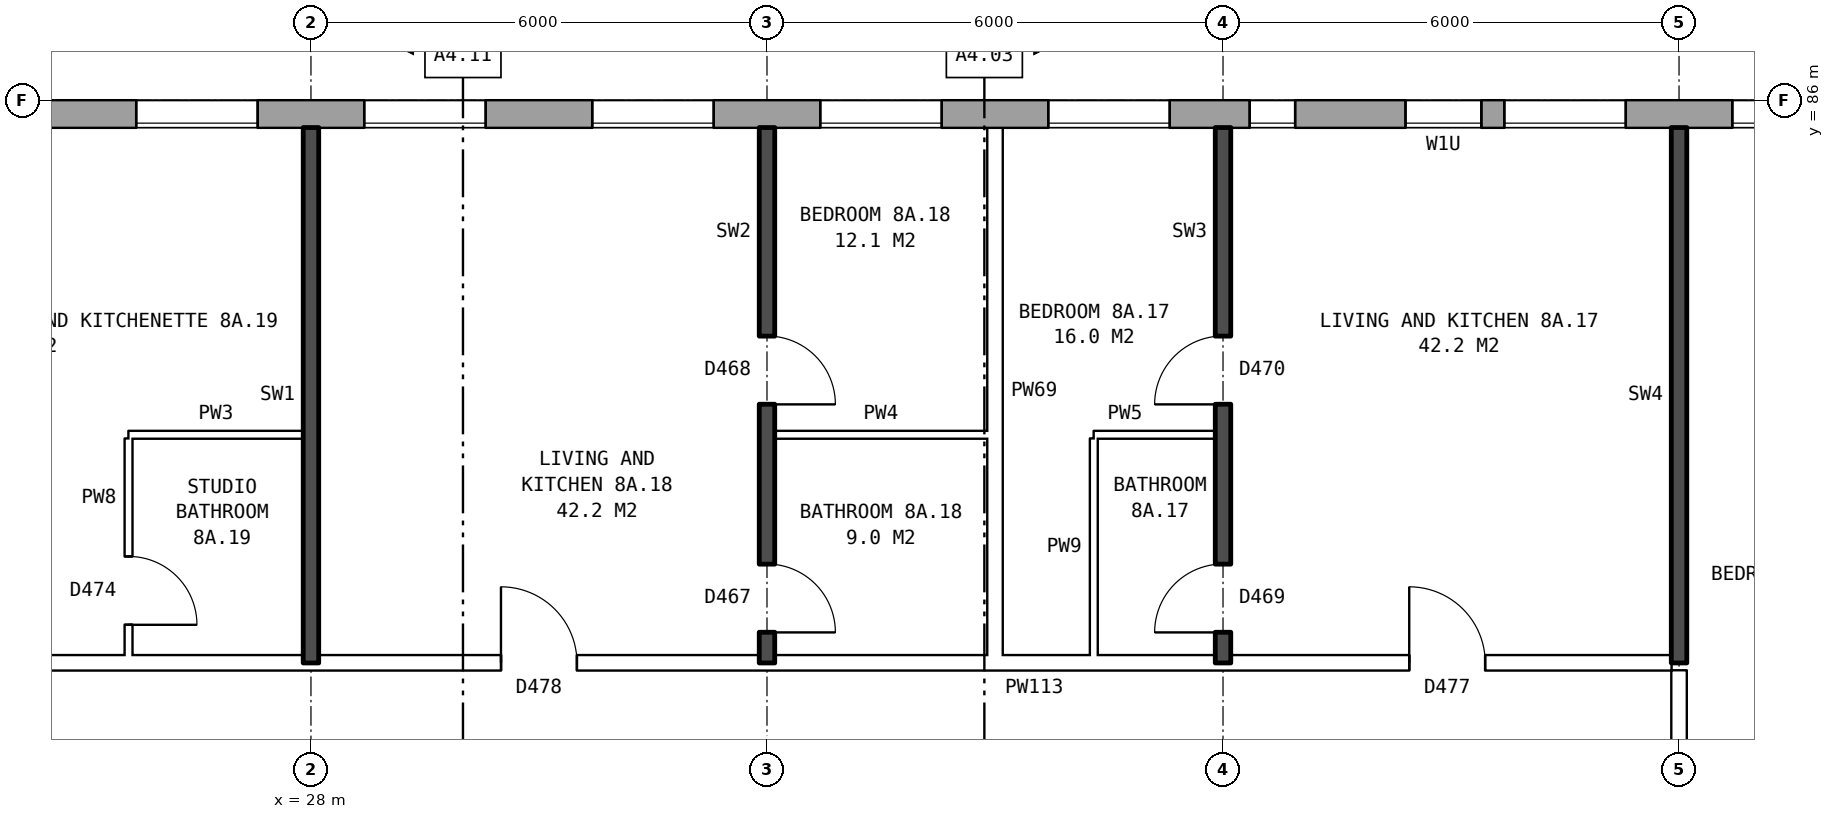
"""IFC4 building model, lengths in metres.
Left out: names, types, materials, properties, quantities, classifications, styles, units other than length and angle.
Written with IfcOpenShell. Run it as: python <this file> out.ifc"""

import sys

from ifc_helpers import new_model, si_unit, direction, frame, frame_2d, origin, place, context, subcontext, project, spatial, rectangle, extrude, element, fill, save


model = new_model("IFC4")
c1 = context("Model", 3, precision=1e-05, world=origin(), true_north=direction((0.0, 1.0)))
c2 = subcontext(c1, "Body", "Model", "MODEL_VIEW")
j1 = project(units=[si_unit("LENGTHUNIT", "METRE"), si_unit("PLANEANGLEUNIT", "RADIAN")], contexts=[c1])
p1 = place(None, origin())
s1 = spatial("IfcSite", under=j1, at=p1, CompositionType="ELEMENT")
p2 = place(p1, origin())
s2 = spatial("IfcBuilding", under=s1, at=p2, CompositionType="ELEMENT")
p3 = place(p2, frame((0.0, 0.0, 31.9)))
s3 = spatial("IfcBuildingStorey", under=s2, at=p3, CompositionType="ELEMENT", Elevation=31.9)
p4 = place(p3, frame((72.925, 85.82, 0.0), z_axis=(0.0, 0.0, 1.0), x_axis=(-1.0, 0.0, 0.0)))
e1 = element("IfcWall", 1, at=p4, inside=s3, PredefinedType="STANDARD", context=c2, shape_type="SweptSolid", body=[
    extrude(rectangle(XDim=50.101, YDim=0.36, at=frame_2d((25.05, 0.0))), origin(), (0.0, 0.0, 1.0), 2.85),
])
p5 = place(p4, frame((0.625, 0.0, 0.8)))
e2 = element("IfcOpeningElement", 2, at=p5, cuts=e1, PredefinedType="OPENING", context=c2, shape_type="SweptSolid", body=[
    extrude(rectangle(XDim=1.6, YDim=1.8, at=frame_2d((0.8, 0.9))), frame((0.0, 0.19, 0.0), z_axis=(0.0, -1.0, 0.0), x_axis=(1.0, 0.0, 0.0)), (0.0, 0.0, 1.0), 0.38),
])
p6 = place(p4, frame((3.625, 0.0, 0.8)))
e3 = element("IfcOpeningElement", 3, at=p6, cuts=e1, PredefinedType="OPENING", context=c2, shape_type="SweptSolid", body=[
    extrude(rectangle(XDim=1.6, YDim=1.8, at=frame_2d((0.8, 0.9))), frame((0.0, 0.19, 0.0), z_axis=(0.0, -1.0, 0.0), x_axis=(1.0, 0.0, 0.0)), (0.0, 0.0, 1.0), 0.38),
])
p7 = place(p4, frame((6.625, 0.0, 0.8)))
e4 = element("IfcOpeningElement", 4, at=p7, cuts=e1, PredefinedType="OPENING", context=c2, shape_type="SweptSolid", body=[
    extrude(rectangle(XDim=1.6, YDim=1.8, at=frame_2d((0.8, 0.9))), frame((0.0, 0.19, 0.0), z_axis=(0.0, -1.0, 0.0), x_axis=(1.0, 0.0, 0.0)), (0.0, 0.0, 1.0), 0.38),
])
p8 = place(p4, frame((9.625, 0.0, 0.8)))
e5 = element("IfcOpeningElement", 5, at=p8, cuts=e1, PredefinedType="OPENING", context=c2, shape_type="SweptSolid", body=[
    extrude(rectangle(XDim=1.6, YDim=1.8, at=frame_2d((0.8, 0.9))), frame((0.0, 0.19, 0.0), z_axis=(0.0, -1.0, 0.0), x_axis=(1.0, 0.0, 0.0)), (0.0, 0.0, 1.0), 0.38),
])
p9 = place(p4, frame((12.625, 0.0, 0.8)))
e6 = element("IfcOpeningElement", 6, at=p9, cuts=e1, PredefinedType="OPENING", context=c2, shape_type="SweptSolid", body=[
    extrude(rectangle(XDim=1.6, YDim=1.8, at=frame_2d((0.8, 0.9))), frame((0.0, 0.19, 0.0), z_axis=(0.0, -1.0, 0.0), x_axis=(1.0, 0.0, 0.0)), (0.0, 0.0, 1.0), 0.38),
])
p10 = place(p4, frame((15.125, 0.0, 0.8)))
e7 = element("IfcOpeningElement", 7, at=p10, cuts=e1, PredefinedType="OPENING", context=c2, shape_type="SweptSolid", body=[
    extrude(rectangle(XDim=1.6, YDim=1.8, at=frame_2d((0.8, 0.9))), frame((0.0, 0.19, 0.0), z_axis=(0.0, -1.0, 0.0), x_axis=(1.0, 0.0, 0.0)), (0.0, 0.0, 1.0), 0.38),
])
p11 = place(p4, frame((18.575, 0.0, 0.15)))
e8 = element("IfcOpeningElement", 8, at=p11, cuts=e1, PredefinedType="OPENING", context=c2, shape_type="SweptSolid", body=[
    extrude(rectangle(XDim=0.6, YDim=0.9, at=frame_2d((0.3, 0.45))), frame((0.0, 0.19, 0.0), z_axis=(0.0, -1.0, 0.0), x_axis=(1.0, 0.0, 0.0)), (0.0, 0.0, 1.0), 0.38),
])
p12 = place(p4, frame((21.625, 0.0, 0.8)))
e9 = element("IfcOpeningElement", 9, at=p12, cuts=e1, PredefinedType="OPENING", context=c2, shape_type="SweptSolid", body=[
    extrude(rectangle(XDim=1.6, YDim=1.8, at=frame_2d((0.8, 0.9))), frame((0.0, 0.19, 0.0), z_axis=(0.0, -1.0, 0.0), x_axis=(1.0, 0.0, 0.0)), (0.0, 0.0, 1.0), 0.38),
])
p13 = place(p4, frame((24.625, 0.0, 0.8)))
e10 = element("IfcOpeningElement", 10, at=p13, cuts=e1, PredefinedType="OPENING", context=c2, shape_type="SweptSolid", body=[
    extrude(rectangle(XDim=1.6, YDim=1.8, at=frame_2d((0.8, 0.9))), frame((0.0, 0.19, 0.0), z_axis=(0.0, -1.0, 0.0), x_axis=(1.0, 0.0, 0.0)), (0.0, 0.0, 1.0), 0.38),
])
p14 = place(p4, frame((27.625, 0.0, 0.8)))
e11 = element("IfcOpeningElement", 11, at=p14, cuts=e1, PredefinedType="OPENING", context=c2, shape_type="SweptSolid", body=[
    extrude(rectangle(XDim=1.6, YDim=1.8, at=frame_2d((0.8, 0.9))), frame((0.0, 0.19, 0.0), z_axis=(0.0, -1.0, 0.0), x_axis=(1.0, 0.0, 0.0)), (0.0, 0.0, 1.0), 0.38),
])
p15 = place(p4, frame((29.525, 0.0, 0.8)))
e12 = element("IfcOpeningElement", 12, at=p15, cuts=e1, PredefinedType="OPENING", context=c2, shape_type="SweptSolid", body=[
    extrude(rectangle(XDim=1.0, YDim=0.9, at=frame_2d((0.5, 0.45))), frame((0.0, 0.19, 0.0), z_axis=(0.0, -1.0, 0.0), x_axis=(1.0, 0.0, 0.0)), (0.0, 0.0, 1.0), 0.38),
])
p16 = place(p4, frame((33.625, 0.0, 0.8)))
e13 = element("IfcOpeningElement", 13, at=p16, cuts=e1, PredefinedType="OPENING", context=c2, shape_type="SweptSolid", body=[
    extrude(rectangle(XDim=1.6, YDim=1.8, at=frame_2d((0.8, 0.9))), frame((0.0, 0.19, 0.0), z_axis=(0.0, -1.0, 0.0), x_axis=(1.0, 0.0, 0.0)), (0.0, 0.0, 1.0), 0.38),
])
p17 = place(p4, frame((36.625, 0.0, 0.8)))
e14 = element("IfcOpeningElement", 14, at=p17, cuts=e1, PredefinedType="OPENING", context=c2, shape_type="SweptSolid", body=[
    extrude(rectangle(XDim=1.6, YDim=1.8, at=frame_2d((0.8, 0.9))), frame((0.0, 0.19, 0.0), z_axis=(0.0, -1.0, 0.0), x_axis=(1.0, 0.0, 0.0)), (0.0, 0.0, 1.0), 0.38),
])
p18 = place(p4, frame((39.625, 0.0, 0.8)))
e15 = element("IfcOpeningElement", 15, at=p18, cuts=e1, PredefinedType="OPENING", context=c2, shape_type="SweptSolid", body=[
    extrude(rectangle(XDim=1.6, YDim=1.8, at=frame_2d((0.8, 0.9))), frame((0.0, 0.19, 0.0), z_axis=(0.0, -1.0, 0.0), x_axis=(1.0, 0.0, 0.0)), (0.0, 0.0, 1.0), 0.38),
])
p19 = place(p4, frame((42.625, 0.0, 0.8)))
e16 = element("IfcOpeningElement", 16, at=p19, cuts=e1, PredefinedType="OPENING", context=c2, shape_type="SweptSolid", body=[
    extrude(rectangle(XDim=1.6, YDim=1.8, at=frame_2d((0.8, 0.9))), frame((0.0, 0.19, 0.0), z_axis=(0.0, -1.0, 0.0), x_axis=(1.0, 0.0, 0.0)), (0.0, 0.0, 1.0), 0.38),
])
p20 = place(p4, frame((45.625, 0.0, 0.8)))
e17 = element("IfcOpeningElement", 17, at=p20, cuts=e1, PredefinedType="OPENING", context=c2, shape_type="SweptSolid", body=[
    extrude(rectangle(XDim=1.6, YDim=1.8, at=frame_2d((0.8, 0.9))), frame((0.0, 0.19, 0.0), z_axis=(0.0, -1.0, 0.0), x_axis=(1.0, 0.0, 0.0)), (0.0, 0.0, 1.0), 0.38),
])
p21 = place(p4, frame((17.025, 0.0, 1.4)))
e18 = element("IfcOpeningElement", 18, at=p21, cuts=e1, PredefinedType="OPENING", context=c2, shape_type="SweptSolid", body=[
    extrude(rectangle(XDim=0.6, YDim=1.2, at=frame_2d((0.3, 0.6))), frame((0.0, 0.19, 0.0), z_axis=(0.0, -1.0, 0.0), x_axis=(1.0, 0.0, 0.0)), (0.0, 0.0, 1.0), 0.38),
])
p22 = place(p4, frame((19.475, 0.0, 0.15)))
e19 = element("IfcOpeningElement", 19, at=p22, cuts=e1, PredefinedType="OPENING", context=c2, shape_type="SweptSolid", body=[
    extrude(rectangle(XDim=1.2, YDim=1.5, at=frame_2d((0.6, 0.75))), frame((0.0, 0.19, 0.0), z_axis=(0.0, -1.0, 0.0), x_axis=(1.0, 0.0, 0.0)), (0.0, 0.0, 1.0), 0.38),
])
p23 = place(p4, frame((31.975, 0.0, 1.7)))
e20 = element("IfcOpeningElement", 20, at=p23, cuts=e1, PredefinedType="OPENING", context=c2, shape_type="SweptSolid", body=[
    extrude(rectangle(XDim=0.6, YDim=0.9, at=frame_2d((0.3, 0.45))), frame((0.0, 0.19, 0.0), z_axis=(0.0, -1.0, 0.0), x_axis=(1.0, 0.0, 0.0)), (0.0, 0.0, 1.0), 0.38),
])
p24 = place(p3, frame((20.11, 78.6, 0.0), z_axis=(0.0, 0.0, 1.0), x_axis=(1.0, 0.0, 0.0)))
e21 = element("IfcWall", 21, at=p24, inside=s3, PredefinedType="PARTITIONING", context=c2, shape_type="SweptSolid", body=[
    extrude(rectangle(XDim=25.79, YDim=0.2, at=frame_2d((12.895, 0.0))), origin(), (0.0, 0.0, 1.0), 2.85),
])
p25 = place(p24, frame((22.34, 0.0, 0.0)))
e22 = element("IfcOpeningElement", 22, at=p25, cuts=e21, PredefinedType="OPENING", context=c2, shape_type="SweptSolid", body=[
    extrude(rectangle(XDim=1.0, YDim=2.1, at=frame_2d((0.5, 1.05))), frame((0.0, 0.11, 0.0), z_axis=(0.0, -1.0, 0.0), x_axis=(1.0, 0.0, 0.0)), (0.0, 0.0, 1.0), 0.22),
])
p26 = place(p24, frame((10.39, 0.0, 0.0)))
e23 = element("IfcOpeningElement", 23, at=p26, cuts=e21, PredefinedType="OPENING", context=c2, shape_type="SweptSolid", body=[
    extrude(rectangle(XDim=1.0, YDim=2.1, at=frame_2d((0.5, 1.05))), frame((0.0, 0.11, 0.0), z_axis=(0.0, -1.0, 0.0), x_axis=(1.0, 0.0, 0.0)), (0.0, 0.0, 1.0), 0.22),
])
p27 = place(p24, frame((2.245, 0.0, 0.0)))
e24 = element("IfcOpeningElement", 24, at=p27, cuts=e21, PredefinedType="OPENING", context=c2, shape_type="SweptSolid", body=[
    extrude(rectangle(XDim=1.0, YDim=2.1, at=frame_2d((0.5, 1.05))), frame((0.0, 0.11, 0.0), z_axis=(0.0, -1.0, 0.0), x_axis=(1.0, 0.0, 0.0)), (0.0, 0.0, 1.0), 0.22),
])
p28 = place(p3, frame((25.6, 81.6, 0.0), z_axis=(0.0, 0.0, 1.0), x_axis=(1.0, 0.0, 0.0)))
e25 = element("IfcWall", 25, at=p28, inside=s3, PredefinedType="PARTITIONING", context=c2, shape_type="SweptSolid", body=[
    extrude(rectangle(XDim=2.3, YDim=0.1, at=frame_2d((1.15, 0.0))), origin(), (0.0, 0.0, 1.0), 2.85),
])
p29 = place(p3, frame((34.1, 81.6, 0.0), z_axis=(0.0, 0.0, 1.0), x_axis=(1.0, 0.0, 0.0)))
e26 = element("IfcWall", 26, at=p29, inside=s3, PredefinedType="PARTITIONING", context=c2, shape_type="SweptSolid", body=[
    extrude(rectangle(XDim=2.8, YDim=0.1, at=frame_2d((1.4, 0.0))), origin(), (0.0, 0.0, 1.0), 2.85),
])
p30 = place(p3, frame((38.3, 81.6, 0.0), z_axis=(0.0, 0.0, 1.0), x_axis=(1.0, 0.0, 0.0)))
e27 = element("IfcWall", 27, at=p30, inside=s3, PredefinedType="PARTITIONING", context=c2, shape_type="SweptSolid", body=[
    extrude(rectangle(XDim=1.6, YDim=0.1, at=frame_2d((0.8, 0.0))), origin(), (0.0, 0.0, 1.0), 2.85),
])
p31 = place(p3, frame((25.6, 78.7, 0.0), z_axis=(0.0, 0.0, 1.0), x_axis=(0.0, 1.0, 0.0)))
e28 = element("IfcWall", 28, at=p31, inside=s3, PredefinedType="PARTITIONING", context=c2, shape_type="SweptSolid", body=[
    extrude(rectangle(XDim=2.85, YDim=0.1, at=frame_2d((1.425, 0.0))), origin(), (0.0, 0.0, 1.0), 2.85),
])
p32 = place(p31, frame((0.4, 0.0, 0.0)))
e29 = element("IfcOpeningElement", 29, at=p32, cuts=e28, PredefinedType="OPENING", context=c2, shape_type="SweptSolid", body=[
    extrude(rectangle(XDim=0.9, YDim=2.1, at=frame_2d((0.45, 1.05))), frame((0.0, 0.06, 0.0), z_axis=(0.0, -1.0, 0.0), x_axis=(1.0, 0.0, 0.0)), (0.0, 0.0, 1.0), 0.12),
])
p33 = place(p3, frame((28.0, 78.6, 0.0), z_axis=(0.0, 0.0, 1.0), x_axis=(0.0, 1.0, 0.0)))
e30 = element("IfcWall", 30, at=p33, inside=s3, PredefinedType="SOLIDWALL", context=c2, shape_type="SweptSolid", body=[
    extrude(rectangle(XDim=7.04, YDim=0.2, at=frame_2d((3.52, 0.0))), origin(), (0.0, 0.0, 1.0), 2.85),
])
p34 = place(p3, frame((34.0, 78.6, 0.0), z_axis=(0.0, 0.0, 1.0), x_axis=(0.0, 1.0, 0.0)))
e31 = element("IfcWall", 31, at=p34, inside=s3, PredefinedType="SOLIDWALL", context=c2, shape_type="SweptSolid", body=[
    extrude(rectangle(XDim=7.04, YDim=0.2, at=frame_2d((3.52, 0.0))), origin(), (0.0, 0.0, 1.0), 2.85),
])
p35 = place(p34, frame((3.4, 0.0, 0.0)))
e32 = element("IfcOpeningElement", 32, at=p35, cuts=e31, PredefinedType="OPENING", context=c2, shape_type="SweptSolid", body=[
    extrude(rectangle(XDim=0.9, YDim=2.1, at=frame_2d((0.45, 1.05))), frame((0.0, 0.11, 0.0), z_axis=(0.0, -1.0, 0.0), x_axis=(1.0, 0.0, 0.0)), (0.0, 0.0, 1.0), 0.22),
])
p36 = place(p34, frame((0.4, 0.0, 0.0)))
e33 = element("IfcOpeningElement", 33, at=p36, cuts=e31, PredefinedType="OPENING", context=c2, shape_type="SweptSolid", body=[
    extrude(rectangle(XDim=0.9, YDim=2.1, at=frame_2d((0.45, 1.05))), frame((0.0, 0.11, 0.0), z_axis=(0.0, -1.0, 0.0), x_axis=(1.0, 0.0, 0.0)), (0.0, 0.0, 1.0), 0.22),
])
p37 = place(p3, frame((37.0, 78.7, 0.0), z_axis=(0.0, 0.0, 1.0), x_axis=(0.0, 1.0, 0.0)))
e34 = element("IfcWall", 34, at=p37, inside=s3, PredefinedType="PARTITIONING", context=c2, shape_type="SweptSolid", body=[
    extrude(rectangle(XDim=6.94, YDim=0.2, at=frame_2d((3.47, 0.0))), origin(), (0.0, 0.0, 1.0), 2.85),
])
p38 = place(p3, frame((38.3, 78.7, 0.0), z_axis=(0.0, 0.0, 1.0), x_axis=(0.0, 1.0, 0.0)))
e35 = element("IfcWall", 35, at=p38, inside=s3, PredefinedType="PARTITIONING", context=c2, shape_type="SweptSolid", body=[
    extrude(rectangle(XDim=2.85, YDim=0.1, at=frame_2d((1.425, 0.0))), origin(), (0.0, 0.0, 1.0), 2.85),
])
p39 = place(p3, frame((40.0, 78.6, 0.0), z_axis=(0.0, 0.0, 1.0), x_axis=(0.0, 1.0, 0.0)))
e36 = element("IfcWall", 36, at=p39, inside=s3, PredefinedType="SOLIDWALL", context=c2, shape_type="SweptSolid", body=[
    extrude(rectangle(XDim=7.04, YDim=0.2, at=frame_2d((3.52, 0.0))), origin(), (0.0, 0.0, 1.0), 2.85),
])
p40 = place(p39, frame((3.4, 0.0, 0.0)))
e37 = element("IfcOpeningElement", 37, at=p40, cuts=e36, PredefinedType="OPENING", context=c2, shape_type="SweptSolid", body=[
    extrude(rectangle(XDim=0.9, YDim=2.1, at=frame_2d((0.45, 1.05))), frame((0.0, 0.11, 0.0), z_axis=(0.0, -1.0, 0.0), x_axis=(1.0, 0.0, 0.0)), (0.0, 0.0, 1.0), 0.22),
])
p41 = place(p39, frame((0.4, 0.0, 0.0)))
e38 = element("IfcOpeningElement", 38, at=p41, cuts=e36, PredefinedType="OPENING", context=c2, shape_type="SweptSolid", body=[
    extrude(rectangle(XDim=0.9, YDim=2.1, at=frame_2d((0.45, 1.05))), frame((0.0, 0.11, 0.0), z_axis=(0.0, -1.0, 0.0), x_axis=(1.0, 0.0, 0.0)), (0.0, 0.0, 1.0), 0.22),
])
p42 = place(p3, frame((46.0, 76.3, 0.0), z_axis=(0.0, 0.0, 1.0), x_axis=(0.0, 1.0, 0.0)))
e39 = element("IfcWall", 39, at=p42, inside=s3, PredefinedType="PARTITIONING", context=c2, shape_type="SweptSolid", body=[
    extrude(rectangle(XDim=2.2, YDim=0.2, at=frame_2d((1.1, 0.0))), origin(), (0.0, 0.0, 1.0), 2.85),
])
p43 = place(p3, frame((46.0, 78.6, 0.0), z_axis=(0.0, 0.0, 1.0), x_axis=(0.0, 1.0, 0.0)))
e40 = element("IfcWall", 40, at=p43, inside=s3, PredefinedType="SOLIDWALL", context=c2, shape_type="SweptSolid", body=[
    extrude(rectangle(XDim=7.04, YDim=0.2, at=frame_2d((3.52, 0.0))), origin(), (0.0, 0.0, 1.0), 2.85),
])
p44 = place(p13, origin())
e41 = element("IfcWindow", 41, at=p44, inside=s3, PartitioningType="SINGLE_PANEL", PredefinedType="WINDOW", context=c2, shape_type="SweptSolid", body=[
    extrude(rectangle(XDim=1.6, YDim=1.8, at=frame_2d((0.8, 0.9))), frame((0.0, 0.15, 0.0), z_axis=(0.0, -1.0, 0.0), x_axis=(1.0, 0.0, 0.0)), (0.0, 0.0, 1.0), 0.06),
])
fill(e10, e41)
p45 = place(p14, origin())
e42 = element("IfcWindow", 42, at=p45, inside=s3, PartitioningType="SINGLE_PANEL", PredefinedType="WINDOW", context=c2, shape_type="SweptSolid", body=[
    extrude(rectangle(XDim=1.6, YDim=1.8, at=frame_2d((0.8, 0.9))), frame((0.0, 0.15, 0.0), z_axis=(0.0, -1.0, 0.0), x_axis=(1.0, 0.0, 0.0)), (0.0, 0.0, 1.0), 0.06),
])
fill(e11, e42)
p46 = place(p15, origin())
e43 = element("IfcWindow", 43, at=p46, inside=s3, PartitioningType="SINGLE_PANEL", PredefinedType="WINDOW", context=c2, shape_type="SweptSolid", body=[
    extrude(rectangle(XDim=1.0, YDim=0.9, at=frame_2d((0.5, 0.45))), frame((0.0, 0.15, 0.0), z_axis=(0.0, -1.0, 0.0), x_axis=(1.0, 0.0, 0.0)), (0.0, 0.0, 1.0), 0.06),
])
fill(e12, e43)
p47 = place(p16, origin())
e44 = element("IfcWindow", 44, at=p47, inside=s3, PartitioningType="SINGLE_PANEL", PredefinedType="WINDOW", context=c2, shape_type="SweptSolid", body=[
    extrude(rectangle(XDim=1.6, YDim=1.8, at=frame_2d((0.8, 0.9))), frame((0.0, 0.15, 0.0), z_axis=(0.0, -1.0, 0.0), x_axis=(1.0, 0.0, 0.0)), (0.0, 0.0, 1.0), 0.06),
])
fill(e13, e44)
p48 = place(p17, origin())
e45 = element("IfcWindow", 45, at=p48, inside=s3, PartitioningType="SINGLE_PANEL", PredefinedType="WINDOW", context=c2, shape_type="SweptSolid", body=[
    extrude(rectangle(XDim=1.6, YDim=1.8, at=frame_2d((0.8, 0.9))), frame((0.0, 0.15, 0.0), z_axis=(0.0, -1.0, 0.0), x_axis=(1.0, 0.0, 0.0)), (0.0, 0.0, 1.0), 0.06),
])
fill(e14, e45)
p49 = place(p18, origin())
e46 = element("IfcWindow", 46, at=p49, inside=s3, PartitioningType="SINGLE_PANEL", PredefinedType="WINDOW", context=c2, shape_type="SweptSolid", body=[
    extrude(rectangle(XDim=1.6, YDim=1.8, at=frame_2d((0.8, 0.9))), frame((0.0, 0.15, 0.0), z_axis=(0.0, -1.0, 0.0), x_axis=(1.0, 0.0, 0.0)), (0.0, 0.0, 1.0), 0.06),
])
fill(e15, e46)
p50 = place(p19, origin())
e47 = element("IfcWindow", 47, at=p50, inside=s3, PartitioningType="SINGLE_PANEL", PredefinedType="WINDOW", context=c2, shape_type="SweptSolid", body=[
    extrude(rectangle(XDim=1.6, YDim=1.8, at=frame_2d((0.8, 0.9))), frame((0.0, 0.15, 0.0), z_axis=(0.0, -1.0, 0.0), x_axis=(1.0, 0.0, 0.0)), (0.0, 0.0, 1.0), 0.06),
])
fill(e16, e47)
p51 = place(p20, origin())
e48 = element("IfcWindow", 48, at=p51, inside=s3, PartitioningType="SINGLE_PANEL", PredefinedType="WINDOW", context=c2, shape_type="SweptSolid", body=[
    extrude(rectangle(XDim=1.6, YDim=1.8, at=frame_2d((0.8, 0.9))), frame((0.0, 0.15, 0.0), z_axis=(0.0, -1.0, 0.0), x_axis=(1.0, 0.0, 0.0)), (0.0, 0.0, 1.0), 0.06),
])
fill(e17, e48)
p52 = place(p40, origin())
e49 = element("IfcDoor", 49, at=p52, inside=s3, OperationType="SINGLE_SWING_LEFT", PredefinedType="DOOR", context=c2, shape_type="SweptSolid", body=[
    extrude(rectangle(XDim=0.9, YDim=2.1, at=frame_2d((0.45, 1.05))), frame((0.0, 0.025, 0.0), z_axis=(0.0, -1.0, 0.0), x_axis=(1.0, 0.0, 0.0)), (0.0, 0.0, 1.0), 0.05),
])
fill(e37, e49)
p53 = place(p25, origin())
e50 = element("IfcDoor", 50, at=p53, inside=s3, OperationType="SINGLE_SWING_LEFT", PredefinedType="DOOR", context=c2, shape_type="SweptSolid", body=[
    extrude(rectangle(XDim=1.0, YDim=2.1, at=frame_2d((0.5, 1.05))), frame((0.0, 0.025, 0.0), z_axis=(0.0, -1.0, 0.0), x_axis=(1.0, 0.0, 0.0)), (0.0, 0.0, 1.0), 0.05),
])
fill(e22, e50)
p54 = place(p41, origin())
e51 = element("IfcDoor", 51, at=p54, inside=s3, OperationType="SINGLE_SWING_LEFT", PredefinedType="DOOR", context=c2, shape_type="SweptSolid", body=[
    extrude(rectangle(XDim=0.9, YDim=2.1, at=frame_2d((0.45, 1.05))), frame((0.0, 0.025, 0.0), z_axis=(0.0, -1.0, 0.0), x_axis=(1.0, 0.0, 0.0)), (0.0, 0.0, 1.0), 0.05),
])
fill(e38, e51)
p55 = place(p35, frame((0.9, 0.0, 0.0), z_axis=(0.0, 0.0, 1.0), x_axis=(-1.0, 0.0, 0.0)))
e52 = element("IfcDoor", 52, at=p55, inside=s3, OperationType="SINGLE_SWING_RIGHT", PredefinedType="DOOR", context=c2, shape_type="SweptSolid", body=[
    extrude(rectangle(XDim=0.9, YDim=2.1, at=frame_2d((0.45, 1.05))), frame((0.0, 0.025, 0.0), z_axis=(0.0, -1.0, 0.0), x_axis=(1.0, 0.0, 0.0)), (0.0, 0.0, 1.0), 0.05),
])
fill(e32, e52)
p56 = place(p26, origin())
e53 = element("IfcDoor", 53, at=p56, inside=s3, OperationType="SINGLE_SWING_LEFT", PredefinedType="DOOR", context=c2, shape_type="SweptSolid", body=[
    extrude(rectangle(XDim=1.0, YDim=2.1, at=frame_2d((0.5, 1.05))), frame((0.0, 0.025, 0.0), z_axis=(0.0, -1.0, 0.0), x_axis=(1.0, 0.0, 0.0)), (0.0, 0.0, 1.0), 0.05),
])
fill(e23, e53)
p57 = place(p36, frame((0.9, 0.0, 0.0), z_axis=(0.0, 0.0, 1.0), x_axis=(-1.0, 0.0, 0.0)))
e54 = element("IfcDoor", 54, at=p57, inside=s3, OperationType="SINGLE_SWING_RIGHT", PredefinedType="DOOR", context=c2, shape_type="SweptSolid", body=[
    extrude(rectangle(XDim=0.9, YDim=2.1, at=frame_2d((0.45, 1.05))), frame((0.0, 0.025, 0.0), z_axis=(0.0, -1.0, 0.0), x_axis=(1.0, 0.0, 0.0)), (0.0, 0.0, 1.0), 0.05),
])
fill(e33, e54)
p58 = place(p32, frame((0.9, 0.0, 0.0), z_axis=(0.0, 0.0, 1.0), x_axis=(-1.0, 0.0, 0.0)))
e55 = element("IfcDoor", 55, at=p58, inside=s3, OperationType="SINGLE_SWING_RIGHT", PredefinedType="DOOR", context=c2, shape_type="SweptSolid", body=[
    extrude(rectangle(XDim=0.9, YDim=2.1, at=frame_2d((0.45, 1.05))), frame((0.0, 0.025, 0.0), z_axis=(0.0, -1.0, 0.0), x_axis=(1.0, 0.0, 0.0)), (0.0, 0.0, 1.0), 0.05),
])
fill(e29, e55)
p59 = place(p23, origin())
e56 = element("IfcWindow", 56, at=p59, inside=s3, PartitioningType="SINGLE_PANEL", PredefinedType="WINDOW", context=c2, shape_type="SweptSolid", body=[
    extrude(rectangle(XDim=0.6, YDim=0.9, at=frame_2d((0.3, 0.45))), frame((0.0, 0.15, 0.0), z_axis=(0.0, -1.0, 0.0), x_axis=(1.0, 0.0, 0.0)), (0.0, 0.0, 1.0), 0.06),
])
fill(e20, e56)
save(model, sys.argv[1])
